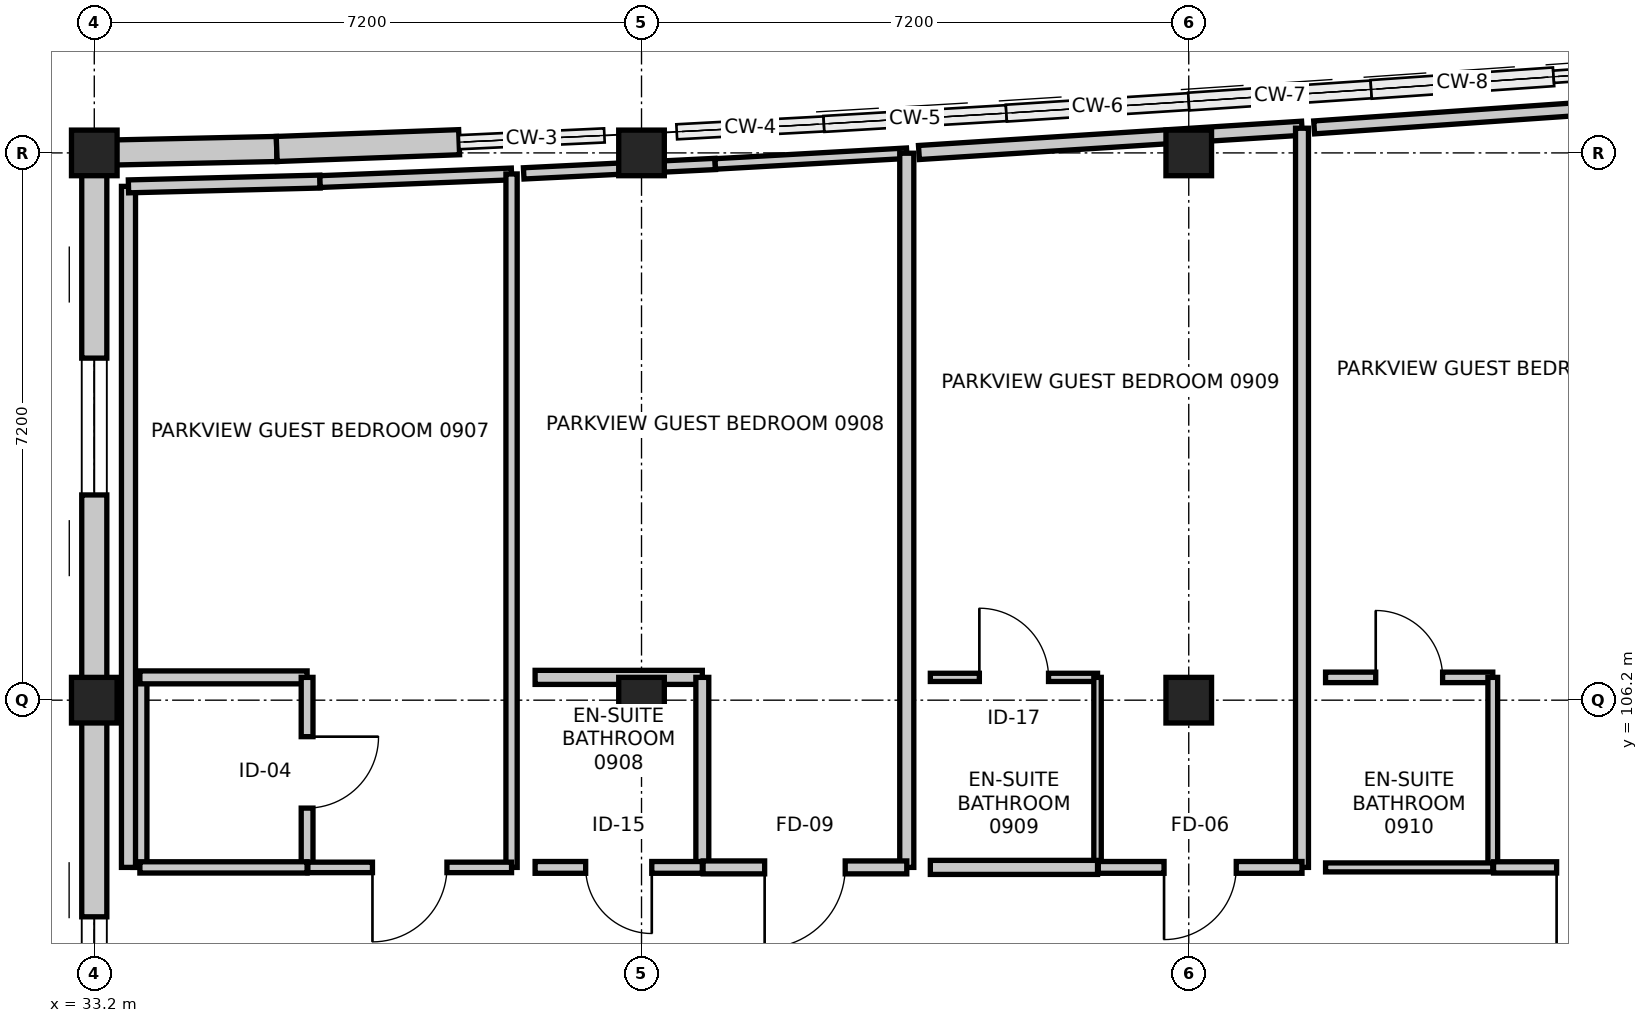
"""IFC4 building model, lengths in metres.
Left out: names, types, materials, properties, quantities, classifications, styles, units other than length and angle.
Written with IfcOpenShell. Run it as: python <this file> out.ifc"""

import sys

from ifc_helpers import new_model, si_unit, direction, frame, frame_2d, origin, origin_2d, place, context, subcontext, project, spatial, rectangle, extrude, element, fill, save


model = new_model("IFC4")
c1 = context("Model", 3, precision=1e-05, world=origin(), true_north=direction((0.0, 1.0)))
c2 = subcontext(c1, "Body", "Model", "MODEL_VIEW")
j1 = project(units=[si_unit("LENGTHUNIT", "METRE"), si_unit("PLANEANGLEUNIT", "RADIAN")], contexts=[c1])
p1 = place(None, origin())
s1 = spatial("IfcSite", under=j1, at=p1, CompositionType="ELEMENT")
p2 = place(p1, origin())
s2 = spatial("IfcBuilding", under=s1, at=p2, CompositionType="ELEMENT")
p3 = place(p2, frame((0.0, 0.0, 37.2)))
s3 = spatial("IfcBuildingStorey", under=s2, at=p3, CompositionType="ELEMENT", Elevation=37.2)
for number, where, z_axis, x_axis in (
    (1, (33.2, 106.2, 0.0), (0.0, 0.0, 1.0), (1.0, 0.0, 0.0)),
    (2, (33.2, 113.4, 0.0), (0.0, 0.0, 1.0), (1.0, 0.0, 0.0)),
    (3, (40.4, 106.2, 0.0), (0.0, 0.0, 1.0), (1.0, 0.0, 0.0)),
    (4, (40.4, 113.4, 0.0), (0.0, 0.0, 1.0), (1.0, 0.0, 0.0)),
    (5, (47.6, 106.2, 0.0), (0.0, 0.0, 1.0), (1.0, 0.0, 0.0)),
    (6, (47.6, 113.4, 0.0), (0.0, 0.0, 1.0), (1.0, 0.0, 0.0)),
):
    element("IfcColumn", number, at=place(p3, frame(where, z_axis=z_axis, x_axis=x_axis)), inside=s3, PredefinedType="COLUMN", context=c2, shape_type="SweptSolid", body=[
        extrude(rectangle(XDim=0.6, YDim=0.6, at=origin_2d()), origin(), (0.0, 0.0, 1.0), 3.6),
    ])
p4 = place(p3, frame((33.2, 113.4, 0.0), z_axis=(0.0, 0.0, 1.0), x_axis=(0.999767568547, 0.021559426766, 0.0)))
e7 = element("IfcWall", 7, at=p4, inside=s3, PredefinedType="STANDARD", context=c2, shape_type="SweptSolid", body=[
    extrude(rectangle(XDim=2.401, YDim=0.33, at=frame_2d((1.2, 0.0))), origin(), (0.0, 0.0, 1.0), 2.765),
])
p5 = place(p3, frame((35.6, 113.452, 0.0), z_axis=(0.0, 0.0, 1.0), x_axis=(0.99930757318, 0.037207179225, 0.0)))
e8 = element("IfcWall", 8, at=p5, inside=s3, PredefinedType="STANDARD", context=c2, shape_type="SweptSolid", body=[
    extrude(rectangle(XDim=2.402, YDim=0.33, at=frame_2d((1.201, 0.0))), origin(), (0.0, 0.0, 1.0), 2.765),
])
p6 = place(p3, frame((33.2, 99.0, 0.0), z_axis=(0.0, 0.0, 1.0), x_axis=(0.0, 1.0, 0.0)))
e9 = element("IfcWall", 9, at=p6, inside=s3, PredefinedType="STANDARD", context=c2, shape_type="SweptSolid", body=[
    extrude(rectangle(XDim=7.2, YDim=0.33, at=frame_2d((3.6, 0.0))), origin(), (0.0, 0.0, 1.0), 2.715),
])
p7 = place(p6, frame((2.85, 0.0, 0.75)))
e10 = element("IfcOpeningElement", 10, at=p7, cuts=e9, PredefinedType="OPENING", context=c2, shape_type="SweptSolid", body=[
    extrude(rectangle(XDim=1.5, YDim=1.5, at=frame_2d((0.75, 0.75))), frame((0.0, 0.175, 0.0), z_axis=(0.0, -1.0, 0.0), x_axis=(1.0, 0.0, 0.0)), (0.0, 0.0, 1.0), 0.35),
])
p8 = place(p3, frame((33.2, 106.2, 0.0), z_axis=(0.0, 0.0, 1.0), x_axis=(0.0, 1.0, 0.0)))
e11 = element("IfcWall", 11, at=p8, inside=s3, PredefinedType="STANDARD", context=c2, shape_type="SweptSolid", body=[
    extrude(rectangle(XDim=7.2, YDim=0.33, at=frame_2d((3.6, 0.0))), origin(), (0.0, 0.0, 1.0), 2.715),
])
p9 = place(p8, frame((2.7, 0.0, 0.75)))
e12 = element("IfcOpeningElement", 12, at=p9, cuts=e11, PredefinedType="OPENING", context=c2, shape_type="SweptSolid", body=[
    extrude(rectangle(XDim=1.8, YDim=1.5, at=frame_2d((0.9, 0.75))), frame((0.0, 0.175, 0.0), z_axis=(0.0, -1.0, 0.0), x_axis=(1.0, 0.0, 0.0)), (0.0, 0.0, 1.0), 0.35),
])
p10 = place(p3, frame((33.8, 104.0, 0.0), z_axis=(0.0, 0.0, 1.0), x_axis=(0.0, 1.0, 0.0)))
e13 = element("IfcWall", 13, at=p10, inside=s3, PredefinedType="PARTITIONING", context=c2, shape_type="SweptSolid", body=[
    extrude(rectangle(XDim=2.5, YDim=0.185, at=frame_2d((1.25, 0.0))), origin(), (0.0, 0.0, 1.0), 2.765),
])
p11 = place(p3, frame((33.8, 106.5, 0.0), z_axis=(0.0, 0.0, 1.0), x_axis=(1.0, 0.0, 0.0)))
e14 = element("IfcWall", 14, at=p11, inside=s3, PredefinedType="PARTITIONING", context=c2, shape_type="SweptSolid", body=[
    extrude(rectangle(XDim=2.2, YDim=0.17, at=frame_2d((1.1, 0.0))), origin(), (0.0, 0.0, 1.0), 2.765),
])
p12 = place(p3, frame((36.0, 106.5, 0.0), z_axis=(0.0, 0.0, 1.0), x_axis=(0.0, -1.0, 0.0)))
e15 = element("IfcWall", 15, at=p12, inside=s3, PredefinedType="PARTITIONING", context=c2, shape_type="SweptSolid", body=[
    extrude(rectangle(XDim=2.5, YDim=0.155, at=frame_2d((1.25, 0.0))), origin(), (0.0, 0.0, 1.0), 2.765),
])
p13 = place(p12, frame((0.78, 0.0, 0.0)))
e16 = element("IfcOpeningElement", 16, at=p13, cuts=e15, PredefinedType="OPENING", context=c2, shape_type="SweptSolid", body=[
    extrude(rectangle(XDim=0.94, YDim=2.12, at=frame_2d((0.47, 1.06))), frame((0.0, 0.087, 0.0), z_axis=(0.0, -1.0, 0.0), x_axis=(1.0, 0.0, 0.0)), (0.0, 0.0, 1.0), 0.175),
])
p14 = place(p3, frame((36.0, 104.0, 0.0), z_axis=(0.0, 0.0, 1.0), x_axis=(-1.0, 0.0, 0.0)))
e17 = element("IfcWall", 17, at=p14, inside=s3, PredefinedType="PARTITIONING", context=c2, shape_type="SweptSolid", body=[
    extrude(rectangle(XDim=2.2, YDim=0.148, at=frame_2d((1.1, 0.0))), origin(), (0.0, 0.0, 1.0), 3.38),
])
p15 = place(p3, frame((33.65, 104.0, 0.0), z_axis=(0.0, 0.0, 1.0), x_axis=(0.0, 1.0, 0.0)))
e18 = element("IfcWall", 18, at=p15, inside=s3, PredefinedType="PARTITIONING", context=c2, shape_type="SweptSolid", body=[
    extrude(rectangle(XDim=8.96, YDim=0.185, at=frame_2d((4.48, 0.0))), origin(), (0.0, 0.0, 1.0), 2.765),
])
p16 = place(p3, frame((33.65, 112.96, 0.0), z_axis=(0.0, 0.0, 1.0), x_axis=(0.999685343429, 0.025084141053, 0.0)))
e19 = element("IfcWall", 19, at=p16, inside=s3, PredefinedType="PARTITIONING", context=c2, shape_type="SweptSolid", body=[
    extrude(rectangle(XDim=2.521, YDim=0.17, at=frame_2d((1.26, 0.0))), origin(), (0.0, 0.0, 1.0), 3.38),
])
p17 = place(p3, frame((36.17, 113.023, 0.0), z_axis=(0.0, 0.0, 1.0), x_axis=(0.999212053971, 0.039689686314, 0.0)))
e20 = element("IfcWall", 20, at=p17, inside=s3, PredefinedType="PARTITIONING", context=c2, shape_type="SweptSolid", body=[
    extrude(rectangle(XDim=2.522, YDim=0.155, at=frame_2d((1.261, 0.0))), origin(), (0.0, 0.0, 1.0), 2.765),
])
p18 = place(p3, frame((38.69, 113.123, 0.0), z_axis=(0.0, 0.0, 1.0), x_axis=(0.0, -1.0, 0.0)))
e21 = element("IfcWall", 21, at=p18, inside=s3, PredefinedType="PARTITIONING", context=c2, shape_type="SweptSolid", body=[
    extrude(rectangle(XDim=9.123, YDim=0.148, at=frame_2d((4.562, 0.0))), origin(), (0.0, 0.0, 1.0), 2.765),
])
p19 = place(p3, frame((38.69, 104.0, 0.0), z_axis=(0.0, 0.0, 1.0), x_axis=(-1.0, 0.0, 0.0)))
e22 = element("IfcWall", 22, at=p19, inside=s3, PredefinedType="PARTITIONING", context=c2, shape_type="SweptSolid", body=[
    extrude(rectangle(XDim=2.68, YDim=0.138, at=frame_2d((1.34, 0.0))), origin(), (0.0, 0.0, 1.0), 3.38),
])
p20 = place(p19, frame((0.85, 0.0, 0.0)))
e23 = element("IfcOpeningElement", 23, at=p20, cuts=e22, PredefinedType="OPENING", context=c2, shape_type="SweptSolid", body=[
    extrude(rectangle(XDim=0.98, YDim=2.15, at=frame_2d((0.49, 1.075))), frame((0.0, 0.079, 0.0), z_axis=(0.0, -1.0, 0.0), x_axis=(1.0, 0.0, 0.0)), (0.0, 0.0, 1.0), 0.158),
])
p21 = place(p3, frame((39.0, 106.5, 0.0), z_axis=(0.0, 0.0, 1.0), x_axis=(1.0, 0.0, 0.0)))
e24 = element("IfcWall", 24, at=p21, inside=s3, PredefinedType="PARTITIONING", context=c2, shape_type="SweptSolid", body=[
    extrude(rectangle(XDim=2.2, YDim=0.185, at=frame_2d((1.1, 0.0))), origin(), (0.0, 0.0, 1.0), 2.715),
])
p22 = place(p3, frame((41.2, 106.5, 0.0), z_axis=(0.0, 0.0, 1.0), x_axis=(0.0, -1.0, 0.0)))
e25 = element("IfcWall", 25, at=p22, inside=s3, PredefinedType="PARTITIONING", context=c2, shape_type="SweptSolid", body=[
    extrude(rectangle(XDim=2.5, YDim=0.17, at=frame_2d((1.25, 0.0))), origin(), (0.0, 0.0, 1.0), 2.765),
])
p23 = place(p3, frame((41.2, 104.0, 0.0), z_axis=(0.0, 0.0, 1.0), x_axis=(-1.0, 0.0, 0.0)))
e26 = element("IfcWall", 26, at=p23, inside=s3, PredefinedType="PARTITIONING", context=c2, shape_type="SweptSolid", body=[
    extrude(rectangle(XDim=2.2, YDim=0.155, at=frame_2d((1.1, 0.0))), origin(), (0.0, 0.0, 1.0), 2.715),
])
p24 = place(p23, frame((0.665, 0.0, 0.0)))
e27 = element("IfcOpeningElement", 27, at=p24, cuts=e26, PredefinedType="OPENING", context=c2, shape_type="SweptSolid", body=[
    extrude(rectangle(XDim=0.87, YDim=2.07, at=frame_2d((0.435, 1.035))), frame((0.0, 0.087, 0.0), z_axis=(0.0, -1.0, 0.0), x_axis=(1.0, 0.0, 0.0)), (0.0, 0.0, 1.0), 0.175),
])
p25 = place(p3, frame((38.85, 113.131, 0.0), z_axis=(0.0, 0.0, 1.0), x_axis=(0.99879112429, 0.049155773216, 0.0)))
e28 = element("IfcWall", 28, at=p25, inside=s3, PredefinedType="PARTITIONING", context=c2, shape_type="SweptSolid", body=[
    extrude(rectangle(XDim=2.523, YDim=0.148, at=frame_2d((1.261, 0.0))), origin(), (0.0, 0.0, 1.0), 2.715),
])
p26 = place(p3, frame((41.37, 113.255, 0.0), z_axis=(0.0, 0.0, 1.0), x_axis=(0.998435548712, 0.055914712446, 0.0)))
e29 = element("IfcWall", 29, at=p26, inside=s3, PredefinedType="PARTITIONING", context=c2, shape_type="SweptSolid", body=[
    extrude(rectangle(XDim=2.524, YDim=0.138, at=frame_2d((1.262, 0.0))), origin(), (0.0, 0.0, 1.0), 2.765),
])
p27 = place(p3, frame((43.89, 113.396, 0.0), z_axis=(0.0, 0.0, 1.0), x_axis=(0.0, -1.0, 0.0)))
e30 = element("IfcWall", 30, at=p27, inside=s3, PredefinedType="PARTITIONING", context=c2, shape_type="SweptSolid", body=[
    extrude(rectangle(XDim=9.396, YDim=0.185, at=frame_2d((4.698, 0.0))), origin(), (0.0, 0.0, 1.0), 2.765),
])
p28 = place(p3, frame((43.89, 104.0, 0.0), z_axis=(0.0, 0.0, 1.0), x_axis=(-1.0, 0.0, 0.0)))
e31 = element("IfcWall", 31, at=p28, inside=s3, PredefinedType="PARTITIONING", context=c2, shape_type="SweptSolid", body=[
    extrude(rectangle(XDim=2.68, YDim=0.17, at=frame_2d((1.34, 0.0))), origin(), (0.0, 0.0, 1.0), 3.38),
])
p29 = place(p28, frame((0.81, 0.0, 0.0)))
e32 = element("IfcOpeningElement", 32, at=p29, cuts=e31, PredefinedType="OPENING", context=c2, shape_type="SweptSolid", body=[
    extrude(rectangle(XDim=1.06, YDim=2.2, at=frame_2d((0.53, 1.1))), frame((0.0, 0.095, 0.0), z_axis=(0.0, -1.0, 0.0), x_axis=(1.0, 0.0, 0.0)), (0.0, 0.0, 1.0), 0.19),
])
p30 = place(p3, frame((44.2, 106.5, 0.0), z_axis=(0.0, 0.0, 1.0), x_axis=(1.0, 0.0, 0.0)))
e33 = element("IfcWall", 33, at=p30, inside=s3, PredefinedType="PARTITIONING", context=c2, shape_type="SweptSolid", body=[
    extrude(rectangle(XDim=2.2, YDim=0.108, at=frame_2d((1.1, 0.0))), origin(), (0.0, 0.0, 1.0), 3.38),
])
p31 = place(p30, frame((0.645, 0.0, 0.0)))
e34 = element("IfcOpeningElement", 34, at=p31, cuts=e33, PredefinedType="OPENING", context=c2, shape_type="SweptSolid", body=[
    extrude(rectangle(XDim=0.91, YDim=2.11, at=frame_2d((0.455, 1.055))), frame((0.0, 0.064, 0.0), z_axis=(0.0, -1.0, 0.0), x_axis=(1.0, 0.0, 0.0)), (0.0, 0.0, 1.0), 0.128),
])
p32 = place(p3, frame((46.4, 106.5, 0.0), z_axis=(0.0, 0.0, 1.0), x_axis=(0.0, -1.0, 0.0)))
e35 = element("IfcWall", 35, at=p32, inside=s3, PredefinedType="PARTITIONING", context=c2, shape_type="SweptSolid", body=[
    extrude(rectangle(XDim=2.5, YDim=0.098, at=frame_2d((1.25, 0.0))), origin(), (0.0, 0.0, 1.0), 2.765),
])
p33 = place(p3, frame((46.4, 104.0, 0.0), z_axis=(0.0, 0.0, 1.0), x_axis=(-1.0, 0.0, 0.0)))
e36 = element("IfcWall", 36, at=p33, inside=s3, PredefinedType="PARTITIONING", context=c2, shape_type="SweptSolid", body=[
    extrude(rectangle(XDim=2.2, YDim=0.185, at=frame_2d((1.1, 0.0))), origin(), (0.0, 0.0, 1.0), 3.38),
])
p34 = place(p3, frame((44.05, 113.405, 0.0), z_axis=(0.0, 0.0, 1.0), x_axis=(0.997995738389, 0.063281167485, 0.0)))
e37 = element("IfcWall", 37, at=p34, inside=s3, PredefinedType="PARTITIONING", context=c2, shape_type="SweptSolid", body=[
    extrude(rectangle(XDim=5.05, YDim=0.185, at=frame_2d((2.525, 0.0))), origin(), (0.0, 0.0, 1.0), 2.765),
])
p35 = place(p3, frame((49.09, 113.725, 0.0), z_axis=(0.0, 0.0, 1.0), x_axis=(0.0, -1.0, 0.0)))
e38 = element("IfcWall", 38, at=p35, inside=s3, PredefinedType="PARTITIONING", context=c2, shape_type="SweptSolid", body=[
    extrude(rectangle(XDim=9.725, YDim=0.17, at=frame_2d((4.862, 0.0))), origin(), (0.0, 0.0, 1.0), 2.765),
])
p36 = place(p3, frame((49.09, 104.0, 0.0), z_axis=(0.0, 0.0, 1.0), x_axis=(-1.0, 0.0, 0.0)))
e39 = element("IfcWall", 39, at=p36, inside=s3, PredefinedType="PARTITIONING", context=c2, shape_type="SweptSolid", body=[
    extrude(rectangle(XDim=2.68, YDim=0.155, at=frame_2d((1.34, 0.0))), origin(), (0.0, 0.0, 1.0), 2.715),
])
p37 = place(p36, frame((0.865, 0.0, 0.0)))
e40 = element("IfcOpeningElement", 40, at=p37, cuts=e39, PredefinedType="OPENING", context=c2, shape_type="SweptSolid", body=[
    extrude(rectangle(XDim=0.95, YDim=2.1, at=frame_2d((0.475, 1.05))), frame((0.0, 0.087, 0.0), z_axis=(0.0, -1.0, 0.0), x_axis=(1.0, 0.0, 0.0)), (0.0, 0.0, 1.0), 0.175),
])
p38 = place(p3, frame((49.4, 106.5, 0.0), z_axis=(0.0, 0.0, 1.0), x_axis=(1.0, 0.0, 0.0)))
e41 = element("IfcWall", 41, at=p38, inside=s3, PredefinedType="PARTITIONING", context=c2, shape_type="SweptSolid", body=[
    extrude(rectangle(XDim=2.2, YDim=0.138, at=frame_2d((1.1, 0.0))), origin(), (0.0, 0.0, 1.0), 3.38),
])
p39 = place(p38, frame((0.66, 0.0, 0.0)))
e42 = element("IfcOpeningElement", 42, at=p39, cuts=e41, PredefinedType="OPENING", context=c2, shape_type="SweptSolid", body=[
    extrude(rectangle(XDim=0.88, YDim=2.06, at=frame_2d((0.44, 1.03))), frame((0.0, 0.079, 0.0), z_axis=(0.0, -1.0, 0.0), x_axis=(1.0, 0.0, 0.0)), (0.0, 0.0, 1.0), 0.158),
])
p40 = place(p3, frame((51.6, 106.5, 0.0), z_axis=(0.0, 0.0, 1.0), x_axis=(0.0, -1.0, 0.0)))
e43 = element("IfcWall", 43, at=p40, inside=s3, PredefinedType="PARTITIONING", context=c2, shape_type="SweptSolid", body=[
    extrude(rectangle(XDim=2.5, YDim=0.128, at=frame_2d((1.25, 0.0))), origin(), (0.0, 0.0, 1.0), 2.765),
])
p41 = place(p3, frame((51.6, 104.0, 0.0), z_axis=(0.0, 0.0, 1.0), x_axis=(-1.0, 0.0, 0.0)))
e44 = element("IfcWall", 44, at=p41, inside=s3, PredefinedType="PARTITIONING", context=c2, shape_type="SweptSolid", body=[
    extrude(rectangle(XDim=2.2, YDim=0.118, at=frame_2d((1.1, 0.0))), origin(), (0.0, 0.0, 1.0), 3.38),
])
p42 = place(p3, frame((49.25, 113.735, 0.0), z_axis=(0.0, 0.0, 1.0), x_axis=(0.997599461477, 0.069248209082, 0.0)))
e45 = element("IfcWall", 45, at=p42, inside=s3, PredefinedType="PARTITIONING", context=c2, shape_type="SweptSolid", body=[
    extrude(rectangle(XDim=5.052, YDim=0.17, at=frame_2d((2.526, 0.0))), origin(), (0.0, 0.0, 1.0), 2.956),
])
p43 = place(p3, frame((54.29, 104.0, 0.0), z_axis=(0.0, 0.0, 1.0), x_axis=(-1.0, 0.0, 0.0)))
e46 = element("IfcWall", 46, at=p43, inside=s3, PredefinedType="PARTITIONING", context=c2, shape_type="SweptSolid", body=[
    extrude(rectangle(XDim=2.68, YDim=0.148, at=frame_2d((1.34, 0.0))), origin(), (0.0, 0.0, 1.0), 3.38),
])
p44 = place(p43, frame((0.83, 0.0, 0.0)))
e47 = element("IfcOpeningElement", 47, at=p44, cuts=e46, PredefinedType="OPENING", context=c2, shape_type="SweptSolid", body=[
    extrude(rectangle(XDim=1.02, YDim=2.15, at=frame_2d((0.51, 1.075))), frame((0.0, 0.084, 0.0), z_axis=(0.0, -1.0, 0.0), x_axis=(1.0, 0.0, 0.0)), (0.0, 0.0, 1.0), 0.168),
])
p45 = place(p7, origin())
e48 = element("IfcWindow", 48, at=p45, inside=s3, PartitioningType="SINGLE_PANEL", PredefinedType="WINDOW", context=c2, shape_type="SweptSolid", body=[
    extrude(rectangle(XDim=1.5, YDim=1.5, at=frame_2d((0.75, 0.75))), frame((0.0, 0.03, 0.0), z_axis=(0.0, -1.0, 0.0), x_axis=(1.0, 0.0, 0.0)), (0.0, 0.0, 1.0), 0.06),
])
fill(e10, e48)
p46 = place(p9, origin())
e49 = element("IfcWindow", 49, at=p46, inside=s3, PartitioningType="SINGLE_PANEL", PredefinedType="WINDOW", context=c2, shape_type="SweptSolid", body=[
    extrude(rectangle(XDim=1.8, YDim=1.5, at=frame_2d((0.9, 0.75))), frame((0.0, 0.03, 0.0), z_axis=(0.0, -1.0, 0.0), x_axis=(1.0, 0.0, 0.0)), (0.0, 0.0, 1.0), 0.06),
])
fill(e12, e49)
p47 = place(p13, origin())
e50 = element("IfcDoor", 50, at=p47, inside=s3, OperationType="SINGLE_SWING_LEFT", PredefinedType="DOOR", context=c2, shape_type="SweptSolid", body=[
    extrude(rectangle(XDim=0.94, YDim=2.12, at=frame_2d((0.47, 1.06))), frame((0.0, 0.025, 0.0), z_axis=(0.0, -1.0, 0.0), x_axis=(1.0, 0.0, 0.0)), (0.0, 0.0, 1.0), 0.05),
])
fill(e16, e50)
p48 = place(p20, origin())
e51 = element("IfcDoor", 51, at=p48, inside=s3, OperationType="SINGLE_SWING_RIGHT", PredefinedType="DOOR", context=c2, shape_type="SweptSolid", body=[
    extrude(rectangle(XDim=0.98, YDim=2.15, at=frame_2d((0.49, 1.075))), frame((0.0, 0.025, 0.0), z_axis=(0.0, -1.0, 0.0), x_axis=(1.0, 0.0, 0.0)), (0.0, 0.0, 1.0), 0.05),
])
fill(e23, e51)
p49 = place(p24, origin())
e52 = element("IfcDoor", 52, at=p49, inside=s3, OperationType="SINGLE_SWING_LEFT", PredefinedType="DOOR", context=c2, shape_type="SweptSolid", body=[
    extrude(rectangle(XDim=0.87, YDim=2.07, at=frame_2d((0.435, 1.035))), frame((0.0, 0.025, 0.0), z_axis=(0.0, -1.0, 0.0), x_axis=(1.0, 0.0, 0.0)), (0.0, 0.0, 1.0), 0.05),
])
fill(e27, e52)
p50 = place(p29, origin())
e53 = element("IfcDoor", 53, at=p50, inside=s3, OperationType="SINGLE_SWING_RIGHT", PredefinedType="DOOR", context=c2, shape_type="SweptSolid", body=[
    extrude(rectangle(XDim=1.06, YDim=2.2, at=frame_2d((0.53, 1.1))), frame((0.0, 0.025, 0.0), z_axis=(0.0, -1.0, 0.0), x_axis=(1.0, 0.0, 0.0)), (0.0, 0.0, 1.0), 0.05),
])
fill(e32, e53)
p51 = place(p31, origin())
e54 = element("IfcDoor", 54, at=p51, inside=s3, OperationType="SINGLE_SWING_LEFT", PredefinedType="DOOR", context=c2, shape_type="SweptSolid", body=[
    extrude(rectangle(XDim=0.91, YDim=2.11, at=frame_2d((0.455, 1.055))), frame((0.0, 0.025, 0.0), z_axis=(0.0, -1.0, 0.0), x_axis=(1.0, 0.0, 0.0)), (0.0, 0.0, 1.0), 0.05),
])
fill(e34, e54)
p52 = place(p37, origin())
e55 = element("IfcDoor", 55, at=p52, inside=s3, OperationType="SINGLE_SWING_RIGHT", PredefinedType="DOOR", context=c2, shape_type="SweptSolid", body=[
    extrude(rectangle(XDim=0.95, YDim=2.1, at=frame_2d((0.475, 1.05))), frame((0.0, 0.025, 0.0), z_axis=(0.0, -1.0, 0.0), x_axis=(1.0, 0.0, 0.0)), (0.0, 0.0, 1.0), 0.05),
])
fill(e40, e55)
p53 = place(p39, origin())
e56 = element("IfcDoor", 56, at=p53, inside=s3, OperationType="SINGLE_SWING_LEFT", PredefinedType="DOOR", context=c2, shape_type="SweptSolid", body=[
    extrude(rectangle(XDim=0.88, YDim=2.06, at=frame_2d((0.44, 1.03))), frame((0.0, 0.025, 0.0), z_axis=(0.0, -1.0, 0.0), x_axis=(1.0, 0.0, 0.0)), (0.0, 0.0, 1.0), 0.05),
])
fill(e42, e56)
p54 = place(p44, origin())
e57 = element("IfcDoor", 57, at=p54, inside=s3, OperationType="SINGLE_SWING_RIGHT", PredefinedType="DOOR", context=c2, shape_type="SweptSolid", body=[
    extrude(rectangle(XDim=1.02, YDim=2.15, at=frame_2d((0.51, 1.075))), frame((0.0, 0.025, 0.0), z_axis=(0.0, -1.0, 0.0), x_axis=(1.0, 0.0, 0.0)), (0.0, 0.0, 1.0), 0.05),
])
fill(e47, e57)
save(model, sys.argv[1])
